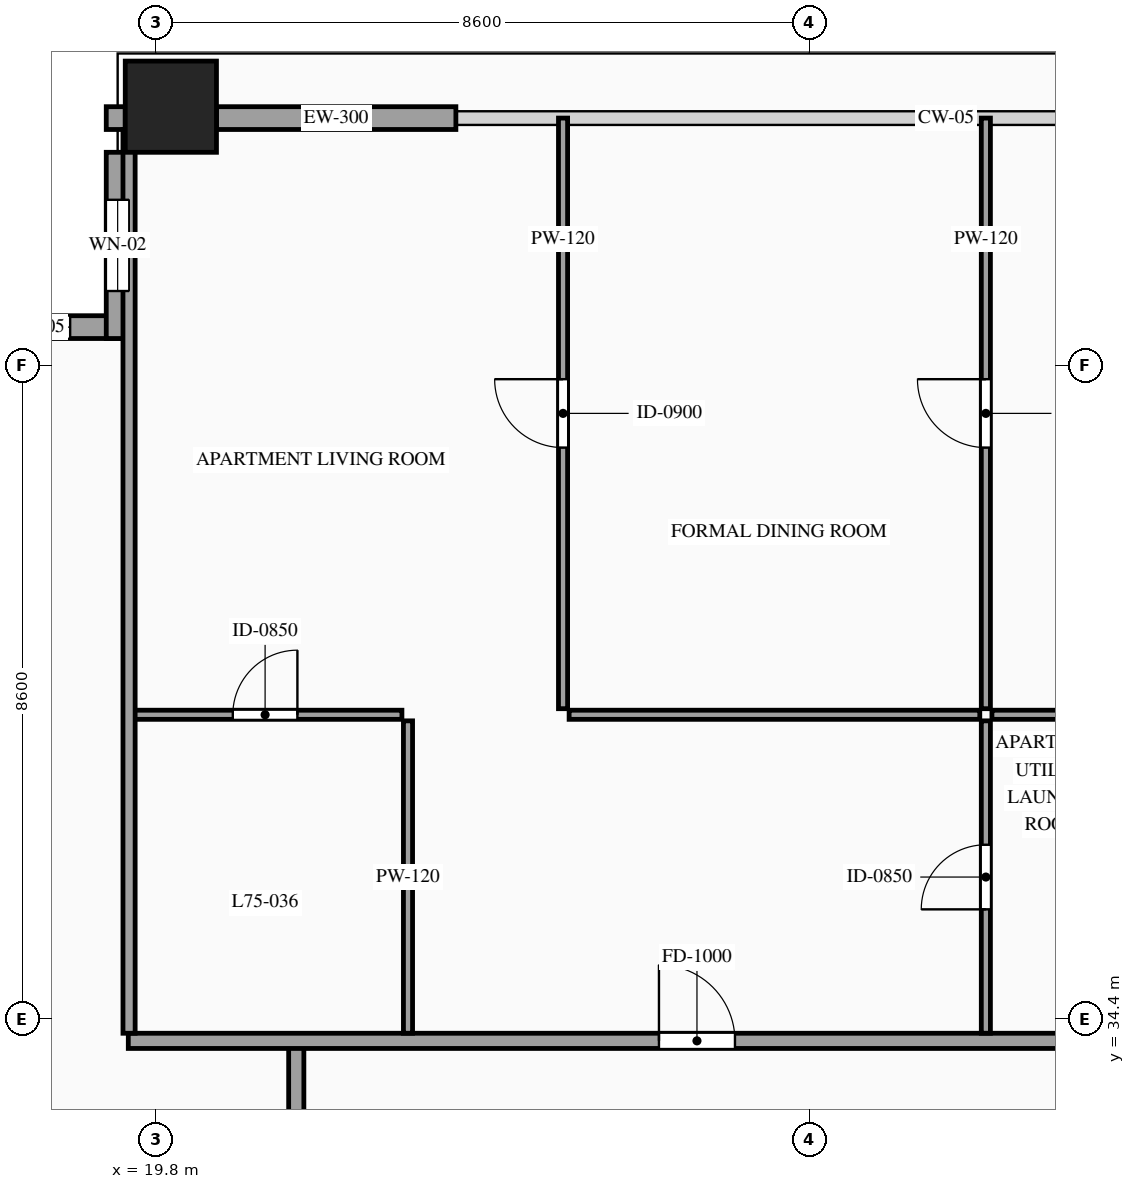
"""IFC4 building model, lengths in metres.
Left out: names, types, materials, properties, quantities, classifications, styles, units other than length and angle.
Written with IfcOpenShell. Run it as: python <this file> out.ifc"""

import sys

from ifc_helpers import new_model, si_unit, direction, frame, frame_2d, origin, origin_2d, place, context, subcontext, project, spatial, rectangle, hollow_rectangle, extrude, source, transform, mapped, element, fill, save


model = new_model("IFC4")
c1 = context("Model", 3, precision=1e-05, world=origin(), true_north=direction((0.0, 1.0)))
c2 = subcontext(c1, "Body", "Model", "MODEL_VIEW")
j1 = project(units=[si_unit("LENGTHUNIT", "METRE"), si_unit("PLANEANGLEUNIT", "RADIAN")], contexts=[c1])
p1 = place(None, origin())
s1 = spatial("IfcSite", under=j1, at=p1, CompositionType="ELEMENT")
p2 = place(p1, origin())
s2 = spatial("IfcBuilding", under=s1, at=p2, CompositionType="ELEMENT")
p3 = place(p2, frame((0.0, 0.0, 282.1)))
s3 = spatial("IfcBuildingStorey", under=s2, at=p3, CompositionType="ELEMENT", Elevation=282.1)
m1 = source(origin(), c2, "Body", "SweptSolid", [
    extrude(hollow_rectangle(XDim=1.2, YDim=1.2, WallThickness=0.055, at=origin_2d()), origin(), (0.0, 0.0, 1.0), 3.28),
])
p4 = place(p3, frame((20.0, 46.4, 0.0), z_axis=(0.0, 0.0, 1.0), x_axis=(1.0, 0.0, 0.0)))
e1 = element("IfcColumn", 1, at=p4, inside=s3, PredefinedType="COLUMN", context=c2, shape_type="MappedRepresentation", body=[
    mapped(m1, transform((0.0, 0.0, 0.0), scale=1.0)),
])
p5 = place(p3, frame((19.45, 43.5, 0.0), z_axis=(0.0, 0.0, 1.0), x_axis=(-1.0, 0.0, 0.0)))
e2 = element("IfcWall", 2, at=p5, inside=s3, PredefinedType="SOLIDWALL", context=c2, shape_type="SweptSolid", body=[
    extrude(rectangle(XDim=2.45, YDim=0.3, at=frame_2d((1.225, 0.0))), origin(), (0.0, 0.0, 1.0), 3.28),
])
p6 = place(p5, frame((0.775, 0.0, 0.85)))
e3 = element("IfcOpeningElement", 3, at=p6, cuts=e2, PredefinedType="OPENING", context=c2, shape_type="SweptSolid", body=[
    extrude(rectangle(XDim=0.9, YDim=1.5, at=frame_2d((0.45, 0.75))), frame((0.0, 0.165, 0.0), z_axis=(0.0, -1.0, 0.0), x_axis=(1.0, 0.0, 0.0)), (0.0, 0.0, 1.0), 0.33),
])
p7 = place(p3, frame((19.3, 45.8, 0.0), z_axis=(0.0, 0.0, 1.0), x_axis=(0.0, -1.0, 0.0)))
e4 = element("IfcWall", 4, at=p7, inside=s3, PredefinedType="SOLIDWALL", context=c2, shape_type="SweptSolid", body=[
    extrude(rectangle(XDim=2.45, YDim=0.3, at=frame_2d((1.225, 0.0))), origin(), (0.0, 0.0, 1.0), 3.28),
])
p8 = place(p7, frame((0.625, 0.0, 0.85)))
e5 = element("IfcOpeningElement", 5, at=p8, cuts=e4, PredefinedType="OPENING", context=c2, shape_type="SweptSolid", body=[
    extrude(rectangle(XDim=1.2, YDim=2.1, at=frame_2d((0.6, 1.05))), frame((0.0, 0.165, 0.0), z_axis=(0.0, -1.0, 0.0), x_axis=(1.0, 0.0, 0.0)), (0.0, 0.0, 1.0), 0.33),
])
m2 = source(origin(), c2, "Body", "SweptSolid", [
    extrude(rectangle(XDim=0.25, YDim=0.3, at=frame_2d((0.125, 0.0))), origin(), (0.0, 0.0, 1.0), 3.28),
])
p9 = place(p3, frame((19.15, 46.25, 0.0), z_axis=(0.0, 0.0, 1.0), x_axis=(1.0, 0.0, 0.0)))
e6 = element("IfcWall", 6, at=p9, inside=s3, PredefinedType="SOLIDWALL", context=c2, shape_type="MappedRepresentation", body=[
    mapped(m2, transform((0.0, 0.0, 0.0), scale=1.0)),
])
m3 = source(origin(), c2, "Body", "SweptSolid", [
    extrude(rectangle(XDim=3.15, YDim=0.3, at=frame_2d((1.575, 0.0))), origin(), (0.0, 0.0, 1.0), 2.835),
])
p10 = place(p3, frame((20.6, 46.25, 0.0), z_axis=(0.0, 0.0, 1.0), x_axis=(1.0, 0.0, 0.0)))
e7 = element("IfcWall", 7, at=p10, inside=s3, PredefinedType="SOLIDWALL", context=c2, shape_type="MappedRepresentation", body=[
    mapped(m3, transform((0.0, 0.0, 0.0), scale=1.0)),
])
m4 = source(origin(), c2, "Body", "SweptSolid", [
    extrude(rectangle(XDim=1.7, YDim=0.2, at=frame_2d((0.85, 0.0))), origin(), (0.0, 0.0, 1.0), 3.28),
])
p11 = place(p3, frame((21.65, 32.35, 0.0), z_axis=(0.0, 0.0, 1.0), x_axis=(0.0, 1.0, 0.0)))
e8 = element("IfcWall", 8, at=p11, inside=s3, PredefinedType="PARTITIONING", context=c2, shape_type="MappedRepresentation", body=[
    mapped(m4, transform((0.0, 0.0, 0.0), scale=1.0)),
])
p12 = place(p3, frame((19.44, 34.11, 0.0), z_axis=(0.0, 0.0, 1.0), x_axis=(1.0, 0.0, 0.0)))
e9 = element("IfcWall", 9, at=p12, inside=s3, PredefinedType="PARTITIONING", context=c2, shape_type="SweptSolid", body=[
    extrude(rectangle(XDim=16.075, YDim=0.2, at=frame_2d((8.038, 0.0))), origin(), (0.0, 0.0, 1.0), 3.28),
])
p13 = place(p12, frame((6.982, 0.0, 0.0)))
e10 = element("IfcOpeningElement", 10, at=p13, cuts=e9, PredefinedType="OPENING", context=c2, shape_type="SweptSolid", body=[
    extrude(rectangle(XDim=1.0, YDim=2.2, at=frame_2d((0.5, 1.1))), frame((0.0, 0.115, 0.0), z_axis=(0.0, -1.0, 0.0), x_axis=(1.0, 0.0, 0.0)), (0.0, 0.0, 1.0), 0.23),
])
p14 = place(p3, frame((19.44, 38.4, 0.0), z_axis=(0.0, 0.0, 1.0), x_axis=(1.0, 0.0, 0.0)))
e11 = element("IfcWall", 11, at=p14, inside=s3, PredefinedType="PARTITIONING", context=c2, shape_type="SweptSolid", body=[
    extrude(rectangle(XDim=3.6, YDim=0.12, at=frame_2d((1.8, 0.0))), origin(), (0.0, 0.0, 1.0), 3.28),
])
p15 = place(p14, frame((1.375, 0.0, 0.0)))
e12 = element("IfcOpeningElement", 12, at=p15, cuts=e11, PredefinedType="OPENING", context=c2, shape_type="SweptSolid", body=[
    extrude(rectangle(XDim=0.85, YDim=2.1, at=frame_2d((0.425, 1.05))), frame((0.0, 0.075, 0.0), z_axis=(0.0, -1.0, 0.0), x_axis=(1.0, 0.0, 0.0)), (0.0, 0.0, 1.0), 0.15),
])
m5 = source(origin(), c2, "Body", "SweptSolid", [
    extrude(rectangle(XDim=4.11, YDim=0.12, at=frame_2d((2.055, 0.0))), origin(), (0.0, 0.0, 1.0), 1.675),
])
p16 = place(p3, frame((23.12, 34.21, 0.0), z_axis=(0.0, 0.0, 1.0), x_axis=(0.0, 1.0, 0.0)))
e13 = element("IfcWall", 13, at=p16, inside=s3, PredefinedType="PARTITIONING", context=c2, shape_type="MappedRepresentation", body=[
    mapped(m5, transform((0.0, 0.0, 0.0), scale=1.0)),
])
m6 = source(origin(), c2, "Body", "SweptSolid", [
    extrude(rectangle(XDim=4.712, YDim=0.12, at=frame_2d((2.356, 0.0))), origin(), (0.0, 0.0, 1.0), 3.28),
])
p17 = place(p3, frame((30.803, 38.4, 0.0), z_axis=(0.0, 0.0, 1.0), x_axis=(1.0, 0.0, 0.0)))
e14 = element("IfcWall", 14, at=p17, inside=s3, PredefinedType="PARTITIONING", context=c2, shape_type="MappedRepresentation", body=[
    mapped(m6, transform((0.0, 0.0, 0.0), scale=1.0)),
])
p18 = place(p3, frame((30.723, 38.48, 0.0), z_axis=(0.0, 0.0, 1.0), x_axis=(0.0, 1.0, 0.0)))
e15 = element("IfcWall", 15, at=p18, inside=s3, PredefinedType="PARTITIONING", context=c2, shape_type="SweptSolid", body=[
    extrude(rectangle(XDim=7.77, YDim=0.12, at=frame_2d((3.885, 0.0))), origin(), (0.0, 0.0, 1.0), 3.28),
])
p19 = place(p18, frame((3.435, 0.0, 0.0)))
e16 = element("IfcOpeningElement", 16, at=p19, cuts=e15, PredefinedType="OPENING", context=c2, shape_type="SweptSolid", body=[
    extrude(rectangle(XDim=0.9, YDim=2.15, at=frame_2d((0.45, 1.075))), frame((0.0, 0.075, 0.0), z_axis=(0.0, -1.0, 0.0), x_axis=(1.0, 0.0, 0.0)), (0.0, 0.0, 1.0), 0.15),
])
p20 = place(p3, frame((30.723, 34.21, 0.0), z_axis=(0.0, 0.0, 1.0), x_axis=(0.0, 1.0, 0.0)))
e17 = element("IfcWall", 17, at=p20, inside=s3, PredefinedType="PARTITIONING", context=c2, shape_type="SweptSolid", body=[
    extrude(rectangle(XDim=4.11, YDim=0.12, at=frame_2d((2.055, 0.0))), origin(), (0.0, 0.0, 1.0), 3.28),
])
p21 = place(p20, frame((1.63, 0.0, 0.0)))
e18 = element("IfcOpeningElement", 18, at=p21, cuts=e17, PredefinedType="OPENING", context=c2, shape_type="SweptSolid", body=[
    extrude(rectangle(XDim=0.85, YDim=2.1, at=frame_2d((0.425, 1.05))), frame((0.0, 0.075, 0.0), z_axis=(0.0, -1.0, 0.0), x_axis=(1.0, 0.0, 0.0)), (0.0, 0.0, 1.0), 0.15),
])
m7 = source(origin(), c2, "Body", "SweptSolid", [
    extrude(rectangle(XDim=5.403, YDim=0.12, at=frame_2d((2.702, 0.0))), origin(), (0.0, 0.0, 1.0), 3.28),
])
p22 = place(p3, frame((25.24, 38.4, 0.0), z_axis=(0.0, 0.0, 1.0), x_axis=(1.0, 0.0, 0.0)))
e19 = element("IfcWall", 19, at=p22, inside=s3, PredefinedType="PARTITIONING", context=c2, shape_type="MappedRepresentation", body=[
    mapped(m7, transform((0.0, 0.0, 0.0), scale=1.0)),
])
p23 = place(p3, frame((25.16, 38.48, 0.0), z_axis=(0.0, 0.0, 1.0), x_axis=(0.0, 1.0, 0.0)))
e20 = element("IfcWall", 20, at=p23, inside=s3, PredefinedType="PARTITIONING", context=c2, shape_type="SweptSolid", body=[
    extrude(rectangle(XDim=7.77, YDim=0.12, at=frame_2d((3.885, 0.0))), origin(), (0.0, 0.0, 1.0), 3.28),
])
p24 = place(p23, frame((3.435, 0.0, 0.0)))
e21 = element("IfcOpeningElement", 21, at=p24, cuts=e20, PredefinedType="OPENING", context=c2, shape_type="SweptSolid", body=[
    extrude(rectangle(XDim=0.9, YDim=2.15, at=frame_2d((0.45, 1.075))), frame((0.0, 0.075, 0.0), z_axis=(0.0, -1.0, 0.0), x_axis=(1.0, 0.0, 0.0)), (0.0, 0.0, 1.0), 0.15),
])
m8 = source(origin(), c2, "Body", "SweptSolid", [
    extrude(rectangle(XDim=11.89, YDim=0.16, at=frame_2d((5.945, 0.0))), origin(), (0.0, 0.0, 1.0), 3.28),
])
p25 = place(p3, frame((19.45, 34.21, 0.0), z_axis=(0.0, 0.0, 1.0), x_axis=(0.0, 1.0, 0.0)))
e22 = element("IfcWall", 22, at=p25, inside=s3, PredefinedType="PARTITIONING", context=c2, shape_type="MappedRepresentation", body=[
    mapped(m8, transform((0.0, 0.0, 0.0), scale=1.0)),
])
m9 = source(origin(), c2, "Body", "SweptSolid", [
    extrude(rectangle(XDim=0.9, YDim=1.5, at=frame_2d((0.45, 0.75))), frame((0.0, 0.03, 0.0), z_axis=(0.0, -1.0, 0.0), x_axis=(1.0, 0.0, 0.0)), (0.0, 0.0, 1.0), 0.06),
])
p26 = place(p6, origin())
e23 = element("IfcWindow", 23, at=p26, inside=s3, PartitioningType="SINGLE_PANEL", PredefinedType="WINDOW", context=c2, shape_type="MappedRepresentation", body=[
    mapped(m9, transform((0.0, 0.0, 0.0), scale=1.0)),
])
fill(e3, e23)
m10 = source(origin(), c2, "Body", "SweptSolid", [
    extrude(rectangle(XDim=1.2, YDim=2.1, at=frame_2d((0.6, 1.05))), frame((0.0, 0.03, 0.0), z_axis=(0.0, -1.0, 0.0), x_axis=(1.0, 0.0, 0.0)), (0.0, 0.0, 1.0), 0.06),
])
p27 = place(p8, origin())
e24 = element("IfcWindow", 24, at=p27, inside=s3, PartitioningType="SINGLE_PANEL", PredefinedType="WINDOW", context=c2, shape_type="MappedRepresentation", body=[
    mapped(m10, transform((0.0, 0.0, 0.0), scale=1.0)),
])
fill(e5, e24)
m11 = source(origin(), c2, "Body", "SweptSolid", [
    extrude(rectangle(XDim=1.0, YDim=2.2, at=frame_2d((0.5, 1.1))), frame((0.0, 0.025, 0.0), z_axis=(0.0, -1.0, 0.0), x_axis=(1.0, 0.0, 0.0)), (0.0, 0.0, 1.0), 0.05),
])
p28 = place(p13, origin())
e25 = element("IfcDoor", 25, at=p28, inside=s3, OperationType="SINGLE_SWING_LEFT", PredefinedType="DOOR", context=c2, shape_type="MappedRepresentation", body=[
    mapped(m11, transform((0.0, 0.0, 0.0), scale=1.0)),
])
fill(e10, e25)
m12 = source(origin(), c2, "Body", "SweptSolid", [
    extrude(rectangle(XDim=0.85, YDim=2.1, at=frame_2d((0.425, 1.05))), frame((0.0, 0.025, 0.0), z_axis=(0.0, -1.0, 0.0), x_axis=(1.0, 0.0, 0.0)), (0.0, 0.0, 1.0), 0.05),
])
p29 = place(p15, origin())
e26 = element("IfcDoor", 26, at=p29, inside=s3, OperationType="SINGLE_SWING_RIGHT", PredefinedType="DOOR", context=c2, shape_type="MappedRepresentation", body=[
    mapped(m12, transform((0.0, 0.0, 0.0), scale=1.0)),
])
fill(e12, e26)
m13 = source(origin(), c2, "Body", "SweptSolid", [
    extrude(rectangle(XDim=0.9, YDim=2.15, at=frame_2d((0.45, 1.075))), frame((0.0, 0.025, 0.0), z_axis=(0.0, -1.0, 0.0), x_axis=(1.0, 0.0, 0.0)), (0.0, 0.0, 1.0), 0.05),
])
p30 = place(p19, origin())
e27 = element("IfcDoor", 27, at=p30, inside=s3, OperationType="SINGLE_SWING_RIGHT", PredefinedType="DOOR", context=c2, shape_type="MappedRepresentation", body=[
    mapped(m13, transform((0.0, 0.0, 0.0), scale=1.0)),
])
fill(e16, e27)
p31 = place(p21, origin())
e28 = element("IfcDoor", 28, at=p31, inside=s3, OperationType="SINGLE_SWING_LEFT", PredefinedType="DOOR", context=c2, shape_type="MappedRepresentation", body=[
    mapped(m12, transform((0.0, 0.0, 0.0), scale=1.0)),
])
fill(e18, e28)
p32 = place(p24, origin())
e29 = element("IfcDoor", 29, at=p32, inside=s3, OperationType="SINGLE_SWING_RIGHT", PredefinedType="DOOR", context=c2, shape_type="MappedRepresentation", body=[
    mapped(m13, transform((0.0, 0.0, 0.0), scale=1.0)),
])
fill(e21, e29)
save(model, sys.argv[1])
